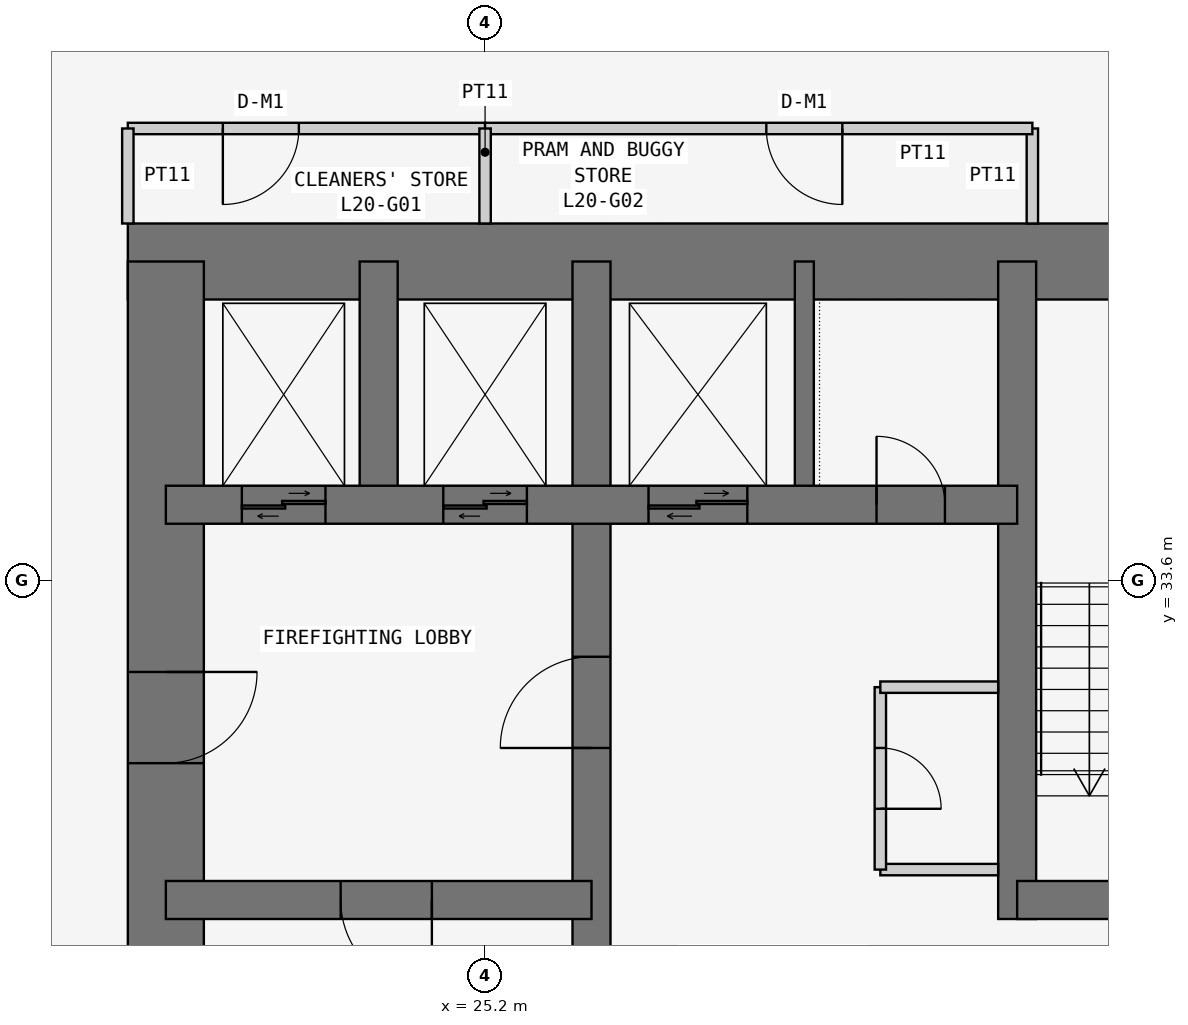
"""IFC4 building model, lengths in metres.
Left out: names, types, materials, properties, quantities, classifications, styles, units other than length and angle.
Written with IfcOpenShell. Run it as: python <this file> out.ifc"""

import sys

from ifc_helpers import new_model, si_unit, direction, frame, frame_2d, origin, place, context, subcontext, project, spatial, rectangle, extrude, element, fill, save


model = new_model("IFC4")
c1 = context("Model", 3, precision=1e-05, world=origin(), true_north=direction((0.0, 1.0)))
c2 = subcontext(c1, "Body", "Model", "MODEL_VIEW")
j1 = project(units=[si_unit("LENGTHUNIT", "METRE"), si_unit("PLANEANGLEUNIT", "RADIAN")], contexts=[c1])
p1 = place(None, origin())
s1 = spatial("IfcSite", under=j1, at=p1, CompositionType="ELEMENT")
p2 = place(p1, origin())
s2 = spatial("IfcBuilding", under=s1, at=p2, CompositionType="ELEMENT")
p3 = place(p2, frame((0.0, 0.0, 81.3)))
s3 = spatial("IfcBuildingStorey", under=s2, at=p3, CompositionType="ELEMENT", Elevation=81.3)
p4 = place(p3, frame((37.8, 37.8, 0.0), z_axis=(0.0, 0.0, 1.0), x_axis=(-1.0, 0.0, 0.0)))
e1 = element("IfcWall", 1, at=p4, inside=s3, PredefinedType="SHEAR", context=c2, shape_type="SweptSolid", body=[
    extrude(rectangle(XDim=17.3, YDim=1.0, at=frame_2d((8.65, 0.0))), origin(), (0.0, 0.0, 1.0), 3.6),
])
p5 = place(p3, frame((21.0, 37.8, 0.0), z_axis=(0.0, 0.0, 1.0), x_axis=(0.0, -1.0, 0.0)))
e2 = element("IfcWall", 2, at=p5, inside=s3, PredefinedType="SHEAR", context=c2, shape_type="SweptSolid", body=[
    extrude(rectangle(XDim=17.3, YDim=1.0, at=frame_2d((8.65, 0.0))), origin(), (0.0, 0.0, 1.0), 3.6),
])
p6 = place(p5, frame((5.4, 0.0, 0.0)))
e3 = element("IfcOpeningElement", 3, at=p6, cuts=e2, PredefinedType="OPENING", context=c2, shape_type="SweptSolid", body=[
    extrude(rectangle(XDim=1.2, YDim=2.1, at=frame_2d((0.6, 1.05))), frame((0.0, 0.51, 0.0), z_axis=(0.0, -1.0, 0.0), x_axis=(1.0, 0.0, 0.0)), (0.0, 0.0, 1.0), 1.02),
])
p7 = place(p3, frame((26.6, 21.0, 0.0), z_axis=(0.0, 0.0, 1.0), x_axis=(0.0, 1.0, 0.0)))
e4 = element("IfcWall", 4, at=p7, inside=s3, PredefinedType="SHEAR", context=c2, shape_type="SweptSolid", body=[
    extrude(rectangle(XDim=16.8, YDim=0.5, at=frame_2d((8.4, 0.0))), origin(), (0.0, 0.0, 1.0), 3.6),
])
p8 = place(p7, frame((10.4, 0.0, 0.0)))
e5 = element("IfcOpeningElement", 5, at=p8, cuts=e4, PredefinedType="OPENING", context=c2, shape_type="SweptSolid", body=[
    extrude(rectangle(XDim=1.2, YDim=2.1, at=frame_2d((0.6, 1.05))), frame((0.0, 0.26, 0.0), z_axis=(0.0, -1.0, 0.0), x_axis=(1.0, 0.0, 0.0)), (0.0, 0.0, 1.0), 0.52),
])
p9 = place(p3, frame((21.0, 29.4, 0.0), z_axis=(0.0, 0.0, 1.0), x_axis=(1.0, 0.0, 0.0)))
e6 = element("IfcWall", 6, at=p9, inside=s3, PredefinedType="SHEAR", context=c2, shape_type="SweptSolid", body=[
    extrude(rectangle(XDim=5.6, YDim=0.5, at=frame_2d((2.8, 0.0))), origin(), (0.0, 0.0, 1.0), 3.6),
])
p10 = place(p9, frame((2.3, 0.0, 0.0)))
e7 = element("IfcOpeningElement", 7, at=p10, cuts=e6, PredefinedType="OPENING", context=c2, shape_type="SweptSolid", body=[
    extrude(rectangle(XDim=1.2, YDim=2.1, at=frame_2d((0.6, 1.05))), frame((0.0, 0.26, 0.0), z_axis=(0.0, -1.0, 0.0), x_axis=(1.0, 0.0, 0.0)), (0.0, 0.0, 1.0), 0.52),
])
p11 = place(p3, frame((21.0, 34.6, 0.0), z_axis=(0.0, 0.0, 1.0), x_axis=(1.0, 0.0, 0.0)))
e8 = element("IfcWall", 8, at=p11, inside=s3, PredefinedType="SHEAR", context=c2, shape_type="SweptSolid", body=[
    extrude(rectangle(XDim=11.2, YDim=0.5, at=frame_2d((5.6, 0.0))), origin(), (0.0, 0.0, 1.0), 3.6),
])
p12 = place(p11, frame((9.35, 0.0, 0.0)))
e9 = element("IfcOpeningElement", 9, at=p12, cuts=e8, PredefinedType="OPENING", context=c2, shape_type="SweptSolid", body=[
    extrude(rectangle(XDim=0.9, YDim=2.1, at=frame_2d((0.45, 1.05))), frame((0.0, 0.26, 0.0), z_axis=(0.0, -1.0, 0.0), x_axis=(1.0, 0.0, 0.0)), (0.0, 0.0, 1.0), 0.52),
])
p13 = place(p11, frame((1.0, 0.0, 0.0)))
e10 = element("IfcOpeningElement", 10, at=p13, cuts=e8, PredefinedType="OPENING", context=c2, shape_type="SweptSolid", body=[
    extrude(rectangle(XDim=1.1, YDim=2.1, at=frame_2d((0.55, 1.05))), frame((0.0, 0.26, 0.0), z_axis=(0.0, -1.0, 0.0), x_axis=(1.0, 0.0, 0.0)), (0.0, 0.0, 1.0), 0.52),
])
p14 = place(p11, frame((3.65, 0.0, 0.0)))
e11 = element("IfcOpeningElement", 11, at=p14, cuts=e8, PredefinedType="OPENING", context=c2, shape_type="SweptSolid", body=[
    extrude(rectangle(XDim=1.1, YDim=2.1, at=frame_2d((0.55, 1.05))), frame((0.0, 0.26, 0.0), z_axis=(0.0, -1.0, 0.0), x_axis=(1.0, 0.0, 0.0)), (0.0, 0.0, 1.0), 0.52),
])
p15 = place(p11, frame((6.35, 0.0, 0.0)))
e12 = element("IfcOpeningElement", 12, at=p15, cuts=e8, PredefinedType="OPENING", context=c2, shape_type="SweptSolid", body=[
    extrude(rectangle(XDim=1.3, YDim=2.1, at=frame_2d((0.65, 1.05))), frame((0.0, 0.26, 0.0), z_axis=(0.0, -1.0, 0.0), x_axis=(1.0, 0.0, 0.0)), (0.0, 0.0, 1.0), 0.52),
])
p16 = place(p3, frame((23.8, 34.6, 0.0), z_axis=(0.0, 0.0, 1.0), x_axis=(0.0, 1.0, 0.0)))
e13 = element("IfcWall", 13, at=p16, inside=s3, PredefinedType="SHEAR", context=c2, shape_type="SweptSolid", body=[
    extrude(rectangle(XDim=3.2, YDim=0.5, at=frame_2d((1.6, 0.0))), origin(), (0.0, 0.0, 1.0), 3.6),
])
p17 = place(p3, frame((32.2, 29.15, 0.0), z_axis=(0.0, 0.0, 1.0), x_axis=(0.0, 1.0, 0.0)))
e14 = element("IfcWall", 14, at=p17, inside=s3, PredefinedType="SHEAR", context=c2, shape_type="SweptSolid", body=[
    extrude(rectangle(XDim=8.65, YDim=0.5, at=frame_2d((4.325, 0.0))), origin(), (0.0, 0.0, 1.0), 3.6),
])
p18 = place(p3, frame((32.2, 29.4, 0.0), z_axis=(0.0, 0.0, 1.0), x_axis=(1.0, 0.0, 0.0)))
e15 = element("IfcWall", 15, at=p18, inside=s3, PredefinedType="SHEAR", context=c2, shape_type="SweptSolid", body=[
    extrude(rectangle(XDim=5.6, YDim=0.5, at=frame_2d((2.8, 0.0))), origin(), (0.0, 0.0, 1.0), 3.6),
])
p19 = place(p18, frame((2.0, 0.0, 0.0)))
e16 = element("IfcOpeningElement", 16, at=p19, cuts=e15, PredefinedType="OPENING", context=c2, shape_type="SweptSolid", body=[
    extrude(rectangle(XDim=1.2, YDim=2.1, at=frame_2d((0.6, 1.05))), frame((0.0, 0.26, 0.0), z_axis=(0.0, -1.0, 0.0), x_axis=(1.0, 0.0, 0.0)), (0.0, 0.0, 1.0), 0.52),
])
p20 = place(p3, frame((29.4, 34.6, 0.0), z_axis=(0.0, 0.0, 1.0), x_axis=(0.0, 1.0, 0.0)))
e17 = element("IfcWall", 17, at=p20, inside=s3, PredefinedType="SHEAR", context=c2, shape_type="SweptSolid", body=[
    extrude(rectangle(XDim=3.2, YDim=0.25, at=frame_2d((1.6, 0.0))), origin(), (0.0, 0.0, 1.0), 3.6),
])
p21 = place(p3, frame((25.2, 39.55, 0.0), z_axis=(0.0, 0.0, 1.0), x_axis=(-1.0, 0.0, 0.0)))
e18 = element("IfcWall", 18, at=p21, inside=s3, PredefinedType="PARTITIONING", context=c2, shape_type="SweptSolid", body=[
    extrude(rectangle(XDim=4.7, YDim=0.15, at=frame_2d((2.35, 0.0))), origin(), (0.0, 0.0, 1.0), 3.45),
])
p22 = place(p21, frame((2.45, 0.0, 0.0)))
e19 = element("IfcOpeningElement", 19, at=p22, cuts=e18, PredefinedType="OPENING", context=c2, shape_type="SweptSolid", body=[
    extrude(rectangle(XDim=1.0, YDim=2.1, at=frame_2d((0.5, 1.05))), frame((0.0, 0.085, 0.0), z_axis=(0.0, -1.0, 0.0), x_axis=(1.0, 0.0, 0.0)), (0.0, 0.0, 1.0), 0.17),
])
for number, where, z_axis, x_axis in (
    (20, (20.5, 39.55, 0.0), (0.0, 0.0, 1.0), (0.0, -1.0, 0.0)),
    (21, (32.4, 38.3, 0.0), (0.0, 0.0, 1.0), (0.0, 1.0, 0.0)),
):
    element("IfcWall", number, at=place(p3, frame(where, z_axis=z_axis, x_axis=x_axis)), inside=s3, PredefinedType="PARTITIONING", context=c2, shape_type="SweptSolid", body=[
        extrude(rectangle(XDim=1.25, YDim=0.15, at=frame_2d((0.625, 0.0))), origin(), (0.0, 0.0, 1.0), 3.45),
    ])
p23 = place(p3, frame((32.4, 39.55, 0.0), z_axis=(0.0, 0.0, 1.0), x_axis=(-1.0, 0.0, 0.0)))
e22 = element("IfcWall", 22, at=p23, inside=s3, PredefinedType="PARTITIONING", context=c2, shape_type="SweptSolid", body=[
    extrude(rectangle(XDim=7.2, YDim=0.15, at=frame_2d((3.6, 0.0))), origin(), (0.0, 0.0, 1.0), 3.45),
])
p24 = place(p23, frame((2.5, 0.0, 0.0)))
e23 = element("IfcOpeningElement", 23, at=p24, cuts=e22, PredefinedType="OPENING", context=c2, shape_type="SweptSolid", body=[
    extrude(rectangle(XDim=1.0, YDim=2.1, at=frame_2d((0.5, 1.05))), frame((0.0, 0.085, 0.0), z_axis=(0.0, -1.0, 0.0), x_axis=(1.0, 0.0, 0.0)), (0.0, 0.0, 1.0), 0.17),
])
p25 = place(p3, frame((25.2, 38.3, 0.0), z_axis=(0.0, 0.0, 1.0), x_axis=(0.0, 1.0, 0.0)))
e24 = element("IfcWall", 24, at=p25, inside=s3, PredefinedType="PARTITIONING", context=c2, shape_type="SweptSolid", body=[
    extrude(rectangle(XDim=1.25, YDim=0.15, at=frame_2d((0.625, 0.0))), origin(), (0.0, 0.0, 1.0), 2.767),
])
p26 = place(p3, frame((31.95, 29.8, 0.0), z_axis=(0.0, 0.0, 1.0), x_axis=(-1.0, 0.0, 0.0)))
e25 = element("IfcWall", 25, at=p26, inside=s3, PredefinedType="PARTITIONING", context=c2, shape_type="SweptSolid", body=[
    extrude(rectangle(XDim=1.55, YDim=0.15, at=frame_2d((0.775, 0.0))), origin(), (0.0, 0.0, 1.0), 3.45),
])
p27 = place(p3, frame((30.4, 29.8, 0.0), z_axis=(0.0, 0.0, 1.0), x_axis=(0.0, 1.0, 0.0)))
e26 = element("IfcWall", 26, at=p27, inside=s3, PredefinedType="PARTITIONING", context=c2, shape_type="SweptSolid", body=[
    extrude(rectangle(XDim=2.4, YDim=0.15, at=frame_2d((1.2, 0.0))), origin(), (0.0, 0.0, 1.0), 3.45),
])
p28 = place(p27, frame((0.8, 0.0, 0.0)))
e27 = element("IfcOpeningElement", 27, at=p28, cuts=e26, PredefinedType="OPENING", context=c2, shape_type="SweptSolid", body=[
    extrude(rectangle(XDim=0.8, YDim=2.1, at=frame_2d((0.4, 1.05))), frame((0.0, 0.085, 0.0), z_axis=(0.0, -1.0, 0.0), x_axis=(1.0, 0.0, 0.0)), (0.0, 0.0, 1.0), 0.17),
])
p29 = place(p3, frame((30.4, 32.2, 0.0), z_axis=(0.0, 0.0, 1.0), x_axis=(1.0, 0.0, 0.0)))
e28 = element("IfcWall", 28, at=p29, inside=s3, PredefinedType="PARTITIONING", context=c2, shape_type="SweptSolid", body=[
    extrude(rectangle(XDim=1.55, YDim=0.15, at=frame_2d((0.775, 0.0))), origin(), (0.0, 0.0, 1.0), 3.45),
])
p30 = place(p22, origin())
e29 = element("IfcDoor", 29, at=p30, inside=s3, OperationType="SINGLE_SWING_RIGHT", PredefinedType="DOOR", context=c2, shape_type="SweptSolid", body=[
    extrude(rectangle(XDim=1.0, YDim=2.1, at=frame_2d((0.5, 1.05))), frame((0.0, 0.025, 0.0), z_axis=(0.0, -1.0, 0.0), x_axis=(1.0, 0.0, 0.0)), (0.0, 0.0, 1.0), 0.05),
])
fill(e19, e29)
p31 = place(p24, origin())
e30 = element("IfcDoor", 30, at=p31, inside=s3, OperationType="SINGLE_SWING_LEFT", PredefinedType="DOOR", context=c2, shape_type="SweptSolid", body=[
    extrude(rectangle(XDim=1.0, YDim=2.1, at=frame_2d((0.5, 1.05))), frame((0.0, 0.025, 0.0), z_axis=(0.0, -1.0, 0.0), x_axis=(1.0, 0.0, 0.0)), (0.0, 0.0, 1.0), 0.05),
])
fill(e23, e30)
p32 = place(p6, origin())
e31 = element("IfcDoor", 31, at=p32, inside=s3, OperationType="SINGLE_SWING_LEFT", PredefinedType="DOOR", context=c2, shape_type="SweptSolid", body=[
    extrude(rectangle(XDim=1.2, YDim=2.1, at=frame_2d((0.6, 1.05))), frame((0.0, 0.025, 0.0), z_axis=(0.0, -1.0, 0.0), x_axis=(1.0, 0.0, 0.0)), (0.0, 0.0, 1.0), 0.05),
])
fill(e3, e31)
p33 = place(p10, frame((1.2, 0.0, 0.0), z_axis=(0.0, 0.0, 1.0), x_axis=(-1.0, 0.0, 0.0)))
e32 = element("IfcDoor", 32, at=p33, inside=s3, OperationType="SINGLE_SWING_LEFT", PredefinedType="DOOR", context=c2, shape_type="SweptSolid", body=[
    extrude(rectangle(XDim=1.2, YDim=2.1, at=frame_2d((0.6, 1.05))), frame((0.0, 0.025, 0.0), z_axis=(0.0, -1.0, 0.0), x_axis=(1.0, 0.0, 0.0)), (0.0, 0.0, 1.0), 0.05),
])
fill(e7, e32)
p34 = place(p8, origin())
e33 = element("IfcDoor", 33, at=p34, inside=s3, OperationType="SINGLE_SWING_LEFT", PredefinedType="DOOR", context=c2, shape_type="SweptSolid", body=[
    extrude(rectangle(XDim=1.2, YDim=2.1, at=frame_2d((0.6, 1.05))), frame((0.0, 0.025, 0.0), z_axis=(0.0, -1.0, 0.0), x_axis=(1.0, 0.0, 0.0)), (0.0, 0.0, 1.0), 0.05),
])
fill(e5, e33)
p35 = place(p12, origin())
e34 = element("IfcDoor", 34, at=p35, inside=s3, OperationType="SINGLE_SWING_LEFT", PredefinedType="DOOR", context=c2, shape_type="SweptSolid", body=[
    extrude(rectangle(XDim=0.9, YDim=2.1, at=frame_2d((0.45, 1.05))), frame((0.0, 0.025, 0.0), z_axis=(0.0, -1.0, 0.0), x_axis=(1.0, 0.0, 0.0)), (0.0, 0.0, 1.0), 0.05),
])
fill(e9, e34)
p36 = place(p28, frame((0.8, 0.0, 0.0), z_axis=(0.0, 0.0, 1.0), x_axis=(-1.0, 0.0, 0.0)))
e35 = element("IfcDoor", 35, at=p36, inside=s3, OperationType="SINGLE_SWING_RIGHT", PredefinedType="DOOR", context=c2, shape_type="SweptSolid", body=[
    extrude(rectangle(XDim=0.8, YDim=2.1, at=frame_2d((0.4, 1.05))), frame((0.0, 0.025, 0.0), z_axis=(0.0, -1.0, 0.0), x_axis=(1.0, 0.0, 0.0)), (0.0, 0.0, 1.0), 0.05),
])
fill(e27, e35)
p37 = place(p13, origin())
e36 = element("IfcDoor", 36, at=p37, inside=s3, OperationType="DOUBLE_DOOR_SLIDING", PredefinedType="DOOR", context=c2, shape_type="SweptSolid", body=[
    extrude(rectangle(XDim=1.1, YDim=2.1, at=frame_2d((0.55, 1.05))), frame((0.0, 0.025, 0.0), z_axis=(0.0, -1.0, 0.0), x_axis=(1.0, 0.0, 0.0)), (0.0, 0.0, 1.0), 0.05),
])
fill(e10, e36)
p38 = place(p14, origin())
e37 = element("IfcDoor", 37, at=p38, inside=s3, OperationType="DOUBLE_DOOR_SLIDING", PredefinedType="DOOR", context=c2, shape_type="SweptSolid", body=[
    extrude(rectangle(XDim=1.1, YDim=2.1, at=frame_2d((0.55, 1.05))), frame((0.0, 0.025, 0.0), z_axis=(0.0, -1.0, 0.0), x_axis=(1.0, 0.0, 0.0)), (0.0, 0.0, 1.0), 0.05),
])
fill(e11, e37)
p39 = place(p15, origin())
e38 = element("IfcDoor", 38, at=p39, inside=s3, OperationType="DOUBLE_DOOR_SLIDING", PredefinedType="DOOR", context=c2, shape_type="SweptSolid", body=[
    extrude(rectangle(XDim=1.3, YDim=2.1, at=frame_2d((0.65, 1.05))), frame((0.0, 0.025, 0.0), z_axis=(0.0, -1.0, 0.0), x_axis=(1.0, 0.0, 0.0)), (0.0, 0.0, 1.0), 0.05),
])
fill(e12, e38)
save(model, sys.argv[1])
